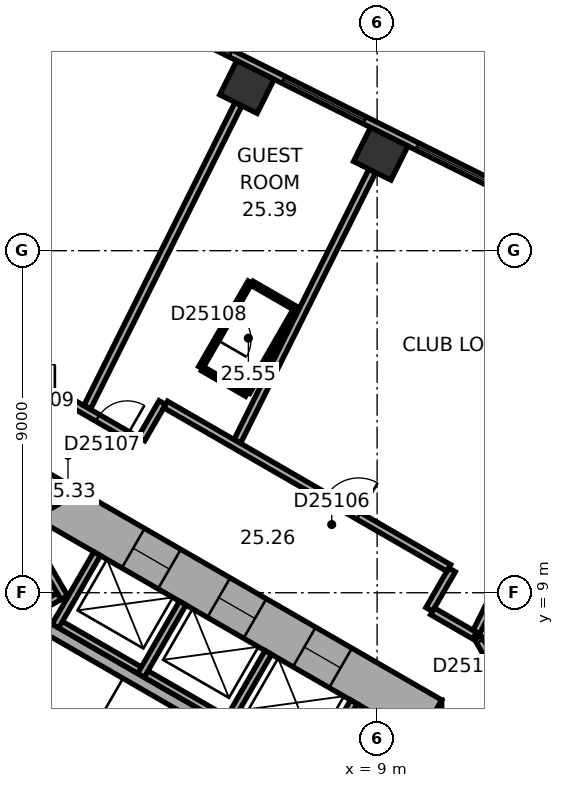
"""IFC4 building model, lengths in metres.
Left out: names, types, materials, properties, quantities, classifications, styles, units other than length and angle.
Written with IfcOpenShell. Run it as: python <this file> out.ifc"""

import sys

from ifc_helpers import new_model, si_unit, direction, frame, frame_2d, origin, origin_2d, place, context, subcontext, project, spatial, rectangle, extrude, element, fill, save


model = new_model("IFC4")
c1 = context("Model", 3, precision=1e-05, world=origin(), true_north=direction((0.0, 1.0)))
c2 = subcontext(c1, "Body", "Model", "MODEL_VIEW")
j1 = project(units=[si_unit("LENGTHUNIT", "METRE"), si_unit("PLANEANGLEUNIT", "RADIAN")], contexts=[c1])
p1 = place(None, origin())
s1 = spatial("IfcSite", under=j1, at=p1, CompositionType="ELEMENT")
p2 = place(p1, origin())
s2 = spatial("IfcBuilding", under=s1, at=p2, CompositionType="ELEMENT")
p3 = place(p2, frame((0.0, 0.0, 106.7)))
s3 = spatial("IfcBuildingStorey", under=s2, at=p3, CompositionType="ELEMENT", Elevation=106.7)
for number, where, z_axis, x_axis in (
    (1, (9.095, 20.551, 0.0), (0.0, 0.0, 1.0), (-0.895, 0.446, 0.0)),
    (2, (5.574, 22.306, 0.0), (0.0, 0.0, 1.0), (-0.895, 0.446, 0.0)),
):
    element("IfcColumn", number, at=place(p3, frame(where, z_axis=z_axis, x_axis=x_axis)), inside=s3, PredefinedType="COLUMN", context=c2, shape_type="SweptSolid", body=[
        extrude(rectangle(XDim=1.1, YDim=1.0, at=origin_2d()), origin(), (0.0, 0.0, 1.0), 3.3),
    ])
p4 = place(p3, frame((10.1, -6.177, 0.0), z_axis=(0.0, 0.0, 1.0), x_axis=(0.0, 1.0, 0.0)))
e3 = element("IfcWall", 3, at=p4, inside=s3, PredefinedType="SHEAR", context=c2, shape_type="SweptSolid", body=[
    extrude(rectangle(XDim=12.355, YDim=1.2, at=frame_2d((6.177, 0.0))), origin(), (0.0, 0.0, 1.0), 3.3),
])
p5 = place(p4, frame((6.378, 0.0, 0.0)))
e4 = element("IfcOpeningElement", 4, at=p5, cuts=e3, PredefinedType="OPENING", context=c2, shape_type="SweptSolid", body=[
    extrude(rectangle(XDim=1.5, YDim=2.1, at=frame_2d((0.75, 1.05))), frame((0.0, 0.61, 0.0), z_axis=(0.0, -1.0, 0.0), x_axis=(1.0, 0.0, 0.0)), (0.0, 0.0, 1.0), 1.22),
])
p6 = place(p4, frame((1.828, 0.0, 0.0)))
e5 = element("IfcOpeningElement", 5, at=p6, cuts=e3, PredefinedType="OPENING", context=c2, shape_type="SweptSolid", body=[
    extrude(rectangle(XDim=1.1, YDim=2.1, at=frame_2d((0.55, 1.05))), frame((0.0, 0.61, 0.0), z_axis=(0.0, -1.0, 0.0), x_axis=(1.0, 0.0, 0.0)), (0.0, 0.0, 1.0), 1.22),
])
p7 = place(p4, frame((4.427, 0.0, 0.0)))
e6 = element("IfcOpeningElement", 6, at=p7, cuts=e3, PredefinedType="OPENING", context=c2, shape_type="SweptSolid", body=[
    extrude(rectangle(XDim=1.1, YDim=2.1, at=frame_2d((0.55, 1.05))), frame((0.0, 0.61, 0.0), z_axis=(0.0, -1.0, 0.0), x_axis=(1.0, 0.0, 0.0)), (0.0, 0.0, 1.0), 1.22),
])
p8 = place(p3, frame((10.4, 5.658, 0.0), z_axis=(0.0, 0.0, 1.0), x_axis=(-0.866021384402, 0.500006961711, 0.0)))
e7 = element("IfcWall", 7, at=p8, inside=s3, PredefinedType="SHEAR", context=c2, shape_type="SweptSolid", body=[
    extrude(rectangle(XDim=12.355, YDim=1.2, at=frame_2d((6.178, 0.0))), origin(), (0.0, 0.0, 1.0), 3.3),
])
p9 = place(p8, frame((2.728, 0.0, 0.0)))
e8 = element("IfcOpeningElement", 8, at=p9, cuts=e7, PredefinedType="OPENING", context=c2, shape_type="SweptSolid", body=[
    extrude(rectangle(XDim=1.1, YDim=2.1, at=frame_2d((0.55, 1.05))), frame((0.0, 0.61, 0.0), z_axis=(0.0, -1.0, 0.0), x_axis=(1.0, 0.0, 0.0)), (0.0, 0.0, 1.0), 1.22),
])
p10 = place(p8, frame((5.328, 0.0, 0.0)))
e9 = element("IfcOpeningElement", 9, at=p10, cuts=e7, PredefinedType="OPENING", context=c2, shape_type="SweptSolid", body=[
    extrude(rectangle(XDim=1.1, YDim=2.1, at=frame_2d((0.55, 1.05))), frame((0.0, 0.61, 0.0), z_axis=(0.0, -1.0, 0.0), x_axis=(1.0, 0.0, 0.0)), (0.0, 0.0, 1.0), 1.22),
])
p11 = place(p8, frame((7.928, 0.0, 0.0)))
e10 = element("IfcOpeningElement", 10, at=p11, cuts=e7, PredefinedType="OPENING", context=c2, shape_type="SweptSolid", body=[
    extrude(rectangle(XDim=1.1, YDim=2.1, at=frame_2d((0.55, 1.05))), frame((0.0, 0.61, 0.0), z_axis=(0.0, -1.0, 0.0), x_axis=(1.0, 0.0, 0.0)), (0.0, 0.0, 1.0), 1.22),
])
p12 = place(p3, frame((0.3, 11.836, 0.0), z_axis=(0.0, 0.0, 1.0), x_axis=(-0.866021384402, -0.500006961711, 0.0)))
e11 = element("IfcWall", 11, at=p12, inside=s3, PredefinedType="SHEAR", context=c2, shape_type="SweptSolid", body=[
    extrude(rectangle(XDim=12.355, YDim=1.2, at=frame_2d((6.178, 0.0))), origin(), (0.0, 0.0, 1.0), 3.3),
])
p13 = place(p12, frame((6.378, 0.0, 0.0)))
e12 = element("IfcOpeningElement", 12, at=p13, cuts=e11, PredefinedType="OPENING", context=c2, shape_type="SweptSolid", body=[
    extrude(rectangle(XDim=1.5, YDim=2.1, at=frame_2d((0.75, 1.05))), frame((0.0, 0.61, 0.0), z_axis=(0.0, -1.0, 0.0), x_axis=(1.0, 0.0, 0.0)), (0.0, 0.0, 1.0), 1.22),
])
p14 = place(p12, frame((1.828, 0.0, 0.0)))
e13 = element("IfcOpeningElement", 13, at=p14, cuts=e11, PredefinedType="OPENING", context=c2, shape_type="SweptSolid", body=[
    extrude(rectangle(XDim=1.1, YDim=2.1, at=frame_2d((0.55, 1.05))), frame((0.0, 0.61, 0.0), z_axis=(0.0, -1.0, 0.0), x_axis=(1.0, 0.0, 0.0)), (0.0, 0.0, 1.0), 1.22),
])
p15 = place(p3, frame((20.63, 15.47, 0.0), z_axis=(0.0, 0.0, 1.0), x_axis=(-0.894934518609, 0.446197498203, 0.0)))
e14 = element("IfcWall", 14, at=p15, inside=s3, PredefinedType="STANDARD", context=c2, shape_type="SweptSolid", body=[
    extrude(rectangle(XDim=21.246, YDim=0.2, at=frame_2d((10.623, 0.0))), origin(), (0.0, 0.0, 1.0), 3.3),
])
p16 = place(p15, frame((1.553, 0.0, 0.8)))
e15 = element("IfcOpeningElement", 15, at=p16, cuts=e14, PredefinedType="OPENING", context=c2, shape_type="SweptSolid", body=[
    extrude(rectangle(XDim=2.4, YDim=1.7, at=frame_2d((1.2, 0.85))), frame((0.0, 0.11, 0.0), z_axis=(0.0, -1.0, 0.0), x_axis=(1.0, 0.0, 0.0)), (0.0, 0.0, 1.0), 0.22),
])
p17 = place(p15, frame((5.488, 0.0, 0.8)))
e16 = element("IfcOpeningElement", 16, at=p17, cuts=e14, PredefinedType="OPENING", context=c2, shape_type="SweptSolid", body=[
    extrude(rectangle(XDim=2.4, YDim=1.7, at=frame_2d((1.2, 0.85))), frame((0.0, 0.11, 0.0), z_axis=(0.0, -1.0, 0.0), x_axis=(1.0, 0.0, 0.0)), (0.0, 0.0, 1.0), 0.22),
])
p18 = place(p15, frame((9.422, 0.0, 0.8)))
e17 = element("IfcOpeningElement", 17, at=p18, cuts=e14, PredefinedType="OPENING", context=c2, shape_type="SweptSolid", body=[
    extrude(rectangle(XDim=2.4, YDim=1.7, at=frame_2d((1.2, 0.85))), frame((0.0, 0.11, 0.0), z_axis=(0.0, -1.0, 0.0), x_axis=(1.0, 0.0, 0.0)), (0.0, 0.0, 1.0), 0.22),
])
p19 = place(p15, frame((13.357, 0.0, 0.8)))
e18 = element("IfcOpeningElement", 18, at=p19, cuts=e14, PredefinedType="OPENING", context=c2, shape_type="SweptSolid", body=[
    extrude(rectangle(XDim=2.4, YDim=1.7, at=frame_2d((1.2, 0.85))), frame((0.0, 0.11, 0.0), z_axis=(0.0, -1.0, 0.0), x_axis=(1.0, 0.0, 0.0)), (0.0, 0.0, 1.0), 0.22),
])
p20 = place(p15, frame((17.292, 0.0, 0.8)))
e19 = element("IfcOpeningElement", 19, at=p20, cuts=e14, PredefinedType="OPENING", context=c2, shape_type="SweptSolid", body=[
    extrude(rectangle(XDim=2.4, YDim=1.7, at=frame_2d((1.2, 0.85))), frame((0.0, 0.11, 0.0), z_axis=(0.0, -1.0, 0.0), x_axis=(1.0, 0.0, 0.0)), (0.0, 0.0, 1.0), 0.22),
])
p21 = place(p3, frame((7.424, 4.259, 0.0), z_axis=(0.0, 0.0, 1.0), x_axis=(-0.866026010844, 0.49999894854, 0.0)))
e20 = element("IfcWall", 20, at=p21, inside=s3, PredefinedType="PARTITIONING", context=c2, shape_type="SweptSolid", body=[
    extrude(rectangle(XDim=8.0, YDim=0.2, at=frame_2d((4.0, 0.0))), origin(), (0.0, 0.0, 1.0), 3.05),
])
for number, where, z_axis, x_axis in (
    (21, (7.287, 4.222, 0.0), (0.0, 0.0, 1.0), (0.5, 0.866, 0.0)),
    (22, (5.036, 5.522, 0.0), (0.0, 0.0, 1.0), (0.5, 0.866, 0.0)),
    (23, (2.784, 6.822, 0.0), (0.0, 0.0, 1.0), (0.5, 0.866, 0.0)),
    (24, (0.532, 8.122, 0.0), (0.0, 0.0, 1.0), (0.5, 0.866, 0.0)),
):
    element("IfcWall", number, at=place(p3, frame(where, z_axis=z_axis, x_axis=x_axis)), inside=s3, PredefinedType="PARTITIONING", context=c2, shape_type="SweptSolid", body=[
        extrude(rectangle(XDim=2.2, YDim=0.2, at=frame_2d((1.1, 0.0))), origin(), (0.0, 0.0, 1.0), 3.05),
    ])
p22 = place(p3, frame((0.803, 9.009, 0.0), z_axis=(0.0, 0.0, 1.0), x_axis=(-0.866028230842, -0.499995103361, 0.0)))
e25 = element("IfcWall", 25, at=p22, inside=s3, PredefinedType="PARTITIONING", context=c2, shape_type="SweptSolid", body=[
    extrude(rectangle(XDim=5.4, YDim=0.2, at=frame_2d((2.7, 0.0))), origin(), (0.0, 0.0, 1.0), 3.05),
])
p23 = place(p3, frame((0.767, 8.872, 0.0), z_axis=(0.0, 0.0, 1.0), x_axis=(-0.499994660107, 0.866028486751, 0.0)))
e26 = element("IfcWall", 26, at=p23, inside=s3, PredefinedType="PARTITIONING", context=c2, shape_type="SweptSolid", body=[
    extrude(rectangle(XDim=2.2, YDim=0.2, at=frame_2d((1.1, 0.0))), origin(), (0.0, 0.0, 1.0), 3.05),
])
p24 = place(p3, frame((6.303, 4.617, 0.0), z_axis=(0.0, 0.0, 1.0), x_axis=(-0.866027801685, 0.499995846692, 0.0)))
e27 = element("IfcWall", 27, at=p24, inside=s3, PredefinedType="SHEAR", context=c2, shape_type="SweptSolid", body=[
    extrude(rectangle(XDim=7.06, YDim=0.3, at=frame_2d((3.53, 0.0))), origin(), (0.0, 0.0, 1.0), 3.05),
])
p25 = place(p3, frame((0.95, 14.001, 0.0), z_axis=(0.0, 0.0, 1.0), x_axis=(-1.0, 0.0, 0.0)))
e28 = element("IfcWall", 28, at=p25, inside=s3, PredefinedType="PARTITIONING", context=c2, shape_type="SweptSolid", body=[
    extrude(rectangle(XDim=1.86, YDim=0.2, at=frame_2d((0.93, 0.0))), origin(), (0.0, 0.0, 1.0), 3.05),
])
p26 = place(p25, frame((0.43, 0.0, 0.0)))
e29 = element("IfcOpeningElement", 29, at=p26, cuts=e28, PredefinedType="OPENING", context=c2, shape_type="SweptSolid", body=[
    extrude(rectangle(XDim=1.0, YDim=2.1, at=frame_2d((0.5, 1.05))), frame((0.0, 0.11, 0.0), z_axis=(0.0, -1.0, 0.0), x_axis=(1.0, 0.0, 0.0)), (0.0, 0.0, 1.0), 0.22),
])
p27 = place(p3, frame((2.748, 12.962, 0.0), z_axis=(0.0, 0.0, 1.0), x_axis=(-0.866013897511, 0.50001992892, 0.0)))
e30 = element("IfcWall", 30, at=p27, inside=s3, PredefinedType="PARTITIONING", context=c2, shape_type="SweptSolid", body=[
    extrude(rectangle(XDim=2.037, YDim=0.2, at=frame_2d((1.018, 0.0))), origin(), (0.0, 0.0, 1.0), 3.05),
])
p28 = place(p27, frame((0.372, 0.0, 0.0)))
e31 = element("IfcOpeningElement", 31, at=p28, cuts=e30, PredefinedType="OPENING", context=c2, shape_type="SweptSolid", body=[
    extrude(rectangle(XDim=0.9, YDim=2.1, at=frame_2d((0.45, 1.05))), frame((0.0, 0.11, 0.0), z_axis=(0.0, -1.0, 0.0), x_axis=(1.0, 0.0, 0.0)), (0.0, 0.0, 1.0), 0.22),
])
p29 = place(p3, frame((3.349, 14.002, 0.0), z_axis=(0.0, 0.0, 1.0), x_axis=(-0.500074377092, -0.865982457891, 0.0)))
e32 = element("IfcWall", 32, at=p29, inside=s3, PredefinedType="PARTITIONING", context=c2, shape_type="SweptSolid", body=[
    extrude(rectangle(XDim=1.101, YDim=0.2, at=frame_2d((0.55, 0.0))), origin(), (0.0, 0.0, 1.0), 3.05),
])
p30 = place(p3, frame((4.356, 14.922, 0.0), z_axis=(0.0, 0.0, 1.0), x_axis=(0.499936506574, 0.866062058628, 0.0)))
e33 = element("IfcWall", 33, at=p30, inside=s3, PredefinedType="PARTITIONING", context=c2, shape_type="SweptSolid", body=[
    extrude(rectangle(XDim=2.6, YDim=0.12, at=frame_2d((1.3, 0.0))), origin(), (0.0, 0.0, 1.0), 3.05),
])
p31 = place(p30, frame((0.85, 0.0, 0.0)))
e34 = element("IfcOpeningElement", 34, at=p31, cuts=e33, PredefinedType="OPENING", context=c2, shape_type="SweptSolid", body=[
    extrude(rectangle(XDim=0.9, YDim=2.1, at=frame_2d((0.45, 1.05))), frame((0.0, 0.07, 0.0), z_axis=(0.0, -1.0, 0.0), x_axis=(1.0, 0.0, 0.0)), (0.0, 0.0, 1.0), 0.14),
])
p32 = place(p3, frame((5.351, 21.859, 0.0), z_axis=(0.0, 0.0, 1.0), x_axis=(-0.446205309328, -0.894930624086, 0.0)))
e35 = element("IfcWall", 35, at=p32, inside=s3, PredefinedType="PARTITIONING", context=c2, shape_type="SweptSolid", body=[
    extrude(rectangle(XDim=8.913, YDim=0.2, at=frame_2d((4.457, 0.0))), origin(), (0.0, 0.0, 1.0), 2.6),
])
p33 = place(p3, frame((5.569, 14.222, 0.0), z_axis=(0.0, 0.0, 1.0), x_axis=(-0.866036909293, 0.499980071345, 0.0)))
e36 = element("IfcWall", 36, at=p33, inside=s3, PredefinedType="PARTITIONING", context=c2, shape_type="SweptSolid", body=[
    extrude(rectangle(XDim=1.34, YDim=0.12, at=frame_2d((0.67, 0.0))), origin(), (0.0, 0.0, 1.0), 3.05),
])
p34 = place(p3, frame((5.708, 17.144, 0.0), z_axis=(0.0, 0.0, 1.0), x_axis=(0.866082447003, -0.499901185229, 0.0)))
e37 = element("IfcWall", 37, at=p34, inside=s3, PredefinedType="PARTITIONING", context=c2, shape_type="SweptSolid", body=[
    extrude(rectangle(XDim=1.34, YDim=0.12, at=frame_2d((0.67, 0.0))), origin(), (0.0, 0.0, 1.0), 3.05),
])
p35 = place(p3, frame((6.839, 16.422, 0.0), z_axis=(0.0, 0.0, 1.0), x_axis=(-0.50000366821, -0.866023285932, 0.0)))
e38 = element("IfcWall", 38, at=p35, inside=s3, PredefinedType="PARTITIONING", context=c2, shape_type="SweptSolid", body=[
    extrude(rectangle(XDim=2.48, YDim=0.12, at=frame_2d((1.24, 0.0))), origin(), (0.0, 0.0, 1.0), 3.05),
])
p36 = place(p3, frame((8.872, 20.104, 0.0), z_axis=(0.0, 0.0, 1.0), x_axis=(-0.446218378653, -0.894924107706, 0.0)))
e39 = element("IfcWall", 39, at=p36, inside=s3, PredefinedType="PARTITIONING", context=c2, shape_type="SweptSolid", body=[
    extrude(rectangle(XDim=7.95, YDim=0.2, at=frame_2d((3.975, 0.0))), origin(), (0.0, 0.0, 1.0), 3.05),
])
p37 = place(p3, frame((10.371, 8.561, 0.0), z_axis=(0.0, 0.0, 1.0), x_axis=(0.499986357472, 0.866033280158, 0.0)))
e40 = element("IfcWall", 40, at=p37, inside=s3, PredefinedType="PARTITIONING", context=c2, shape_type="SweptSolid", body=[
    extrude(rectangle(XDim=1.201, YDim=0.2, at=frame_2d((0.601, 0.0))), origin(), (0.0, 0.0, 1.0), 3.05),
])
p38 = place(p3, frame((10.885, 9.652, 0.0), z_axis=(0.0, 0.0, 1.0), x_axis=(-0.866033868542, 0.499985338323, 0.0)))
e41 = element("IfcWall", 41, at=p38, inside=s3, PredefinedType="PARTITIONING", context=c2, shape_type="SweptSolid", body=[
    extrude(rectangle(XDim=8.602, YDim=0.2, at=frame_2d((4.301, 0.0))), origin(), (0.0, 0.0, 1.0), 3.05),
])
p39 = place(p38, frame((2.739, 0.0, 0.0)))
e42 = element("IfcOpeningElement", 42, at=p39, cuts=e41, PredefinedType="OPENING", context=c2, shape_type="SweptSolid", body=[
    extrude(rectangle(XDim=1.0, YDim=2.1, at=frame_2d((0.5, 1.05))), frame((0.0, 0.11, 0.0), z_axis=(0.0, -1.0, 0.0), x_axis=(1.0, 0.0, 0.0)), (0.0, 0.0, 1.0), 0.22),
])
p40 = place(p3, frame((11.566, 7.871, 0.0), z_axis=(0.0, 0.0, 1.0), x_axis=(-0.866004557827, 0.500036104519, 0.0)))
e43 = element("IfcWall", 43, at=p40, inside=s3, PredefinedType="PARTITIONING", context=c2, shape_type="SweptSolid", body=[
    extrude(rectangle(XDim=1.28, YDim=0.2, at=frame_2d((0.64, 0.0))), origin(), (0.0, 0.0, 1.0), 3.05),
])
p41 = place(p3, frame((12.218, 6.839, 0.0), z_axis=(0.0, 0.0, 1.0), x_axis=(-0.500044870432, 0.865999496279, 0.0)))
e44 = element("IfcWall", 44, at=p41, inside=s3, PredefinedType="PARTITIONING", context=c2, shape_type="SweptSolid", body=[
    extrude(rectangle(XDim=1.136, YDim=0.2, at=frame_2d((0.568, 0.0))), origin(), (0.0, 0.0, 1.0), 3.05),
])
p42 = place(p41, frame((0.118, 0.0, 0.0)))
e45 = element("IfcOpeningElement", 45, at=p42, cuts=e44, PredefinedType="OPENING", context=c2, shape_type="SweptSolid", body=[
    extrude(rectangle(XDim=0.9, YDim=2.1, at=frame_2d((0.45, 1.05))), frame((0.0, 0.11, 0.0), z_axis=(0.0, -1.0, 0.0), x_axis=(1.0, 0.0, 0.0)), (0.0, 0.0, 1.0), 0.22),
])
p43 = place(p3, frame((15.915, 16.592, 0.0), z_axis=(0.0, 0.0, 1.0), x_axis=(-0.446199736347, -0.894933402709, 0.0)))
e46 = element("IfcWall", 46, at=p43, inside=s3, PredefinedType="PARTITIONING", context=c2, shape_type="SweptSolid", body=[
    extrude(rectangle(XDim=9.635, YDim=0.2, at=frame_2d((4.817, 0.0))), origin(), (0.0, 0.0, 1.0), 3.05),
])
p44 = place(p18, origin())
e47 = element("IfcWindow", 47, at=p44, inside=s3, PartitioningType="SINGLE_PANEL", PredefinedType="WINDOW", context=c2, shape_type="SweptSolid", body=[
    extrude(rectangle(XDim=2.4, YDim=1.7, at=frame_2d((1.2, 0.85))), frame((0.0, 0.03, 0.0), z_axis=(0.0, -1.0, 0.0), x_axis=(1.0, 0.0, 0.0)), (0.0, 0.0, 1.0), 0.06),
])
fill(e17, e47)
p45 = place(p19, origin())
e48 = element("IfcWindow", 48, at=p45, inside=s3, PartitioningType="SINGLE_PANEL", PredefinedType="WINDOW", context=c2, shape_type="SweptSolid", body=[
    extrude(rectangle(XDim=2.4, YDim=1.7, at=frame_2d((1.2, 0.85))), frame((0.0, 0.03, 0.0), z_axis=(0.0, -1.0, 0.0), x_axis=(1.0, 0.0, 0.0)), (0.0, 0.0, 1.0), 0.06),
])
fill(e18, e48)
p46 = place(p20, origin())
e49 = element("IfcWindow", 49, at=p46, inside=s3, PartitioningType="SINGLE_PANEL", PredefinedType="WINDOW", context=c2, shape_type="SweptSolid", body=[
    extrude(rectangle(XDim=2.4, YDim=1.7, at=frame_2d((1.2, 0.85))), frame((0.0, 0.03, 0.0), z_axis=(0.0, -1.0, 0.0), x_axis=(1.0, 0.0, 0.0)), (0.0, 0.0, 1.0), 0.06),
])
fill(e19, e49)
p47 = place(p9, origin())
e50 = element("IfcDoor", 50, at=p47, inside=s3, OperationType="DOUBLE_DOOR_SLIDING", PredefinedType="DOOR", context=c2, shape_type="SweptSolid", body=[
    extrude(rectangle(XDim=1.1, YDim=2.1, at=frame_2d((0.55, 1.05))), frame((0.0, 0.025, 0.0), z_axis=(0.0, -1.0, 0.0), x_axis=(1.0, 0.0, 0.0)), (0.0, 0.0, 1.0), 0.05),
])
fill(e8, e50)
p48 = place(p10, origin())
e51 = element("IfcDoor", 51, at=p48, inside=s3, OperationType="DOUBLE_DOOR_SLIDING", PredefinedType="DOOR", context=c2, shape_type="SweptSolid", body=[
    extrude(rectangle(XDim=1.1, YDim=2.1, at=frame_2d((0.55, 1.05))), frame((0.0, 0.025, 0.0), z_axis=(0.0, -1.0, 0.0), x_axis=(1.0, 0.0, 0.0)), (0.0, 0.0, 1.0), 0.05),
])
fill(e9, e51)
p49 = place(p11, origin())
e52 = element("IfcDoor", 52, at=p49, inside=s3, OperationType="DOUBLE_DOOR_SLIDING", PredefinedType="DOOR", context=c2, shape_type="SweptSolid", body=[
    extrude(rectangle(XDim=1.1, YDim=2.1, at=frame_2d((0.55, 1.05))), frame((0.0, 0.025, 0.0), z_axis=(0.0, -1.0, 0.0), x_axis=(1.0, 0.0, 0.0)), (0.0, 0.0, 1.0), 0.05),
])
fill(e10, e52)
p50 = place(p42, origin())
e53 = element("IfcDoor", 53, at=p50, inside=s3, OperationType="SINGLE_SWING_LEFT", PredefinedType="DOOR", context=c2, shape_type="SweptSolid", body=[
    extrude(rectangle(XDim=0.9, YDim=2.1, at=frame_2d((0.45, 1.05))), frame((0.0, 0.025, 0.0), z_axis=(0.0, -1.0, 0.0), x_axis=(1.0, 0.0, 0.0)), (0.0, 0.0, 1.0), 0.05),
])
fill(e45, e53)
p51 = place(p39, origin())
e54 = element("IfcDoor", 54, at=p51, inside=s3, OperationType="SINGLE_SWING_LEFT", PredefinedType="DOOR", context=c2, shape_type="SweptSolid", body=[
    extrude(rectangle(XDim=1.0, YDim=2.1, at=frame_2d((0.5, 1.05))), frame((0.0, 0.025, 0.0), z_axis=(0.0, -1.0, 0.0), x_axis=(1.0, 0.0, 0.0)), (0.0, 0.0, 1.0), 0.05),
])
fill(e42, e54)
p52 = place(p28, origin())
e55 = element("IfcDoor", 55, at=p52, inside=s3, OperationType="SINGLE_SWING_LEFT", PredefinedType="DOOR", context=c2, shape_type="SweptSolid", body=[
    extrude(rectangle(XDim=0.9, YDim=2.1, at=frame_2d((0.45, 1.05))), frame((0.0, 0.025, 0.0), z_axis=(0.0, -1.0, 0.0), x_axis=(1.0, 0.0, 0.0)), (0.0, 0.0, 1.0), 0.05),
])
fill(e31, e55)
p53 = place(p31, origin())
e56 = element("IfcDoor", 56, at=p53, inside=s3, OperationType="SINGLE_SWING_LEFT", PredefinedType="DOOR", context=c2, shape_type="SweptSolid", body=[
    extrude(rectangle(XDim=0.9, YDim=2.1, at=frame_2d((0.45, 1.05))), frame((0.0, 0.025, 0.0), z_axis=(0.0, -1.0, 0.0), x_axis=(1.0, 0.0, 0.0)), (0.0, 0.0, 1.0), 0.05),
])
fill(e34, e56)
p54 = place(p26, origin())
e57 = element("IfcDoor", 57, at=p54, inside=s3, OperationType="SINGLE_SWING_LEFT", PredefinedType="DOOR", context=c2, shape_type="SweptSolid", body=[
    extrude(rectangle(XDim=1.0, YDim=2.1, at=frame_2d((0.5, 1.05))), frame((0.0, 0.025, 0.0), z_axis=(0.0, -1.0, 0.0), x_axis=(1.0, 0.0, 0.0)), (0.0, 0.0, 1.0), 0.05),
])
fill(e29, e57)
save(model, sys.argv[1])
